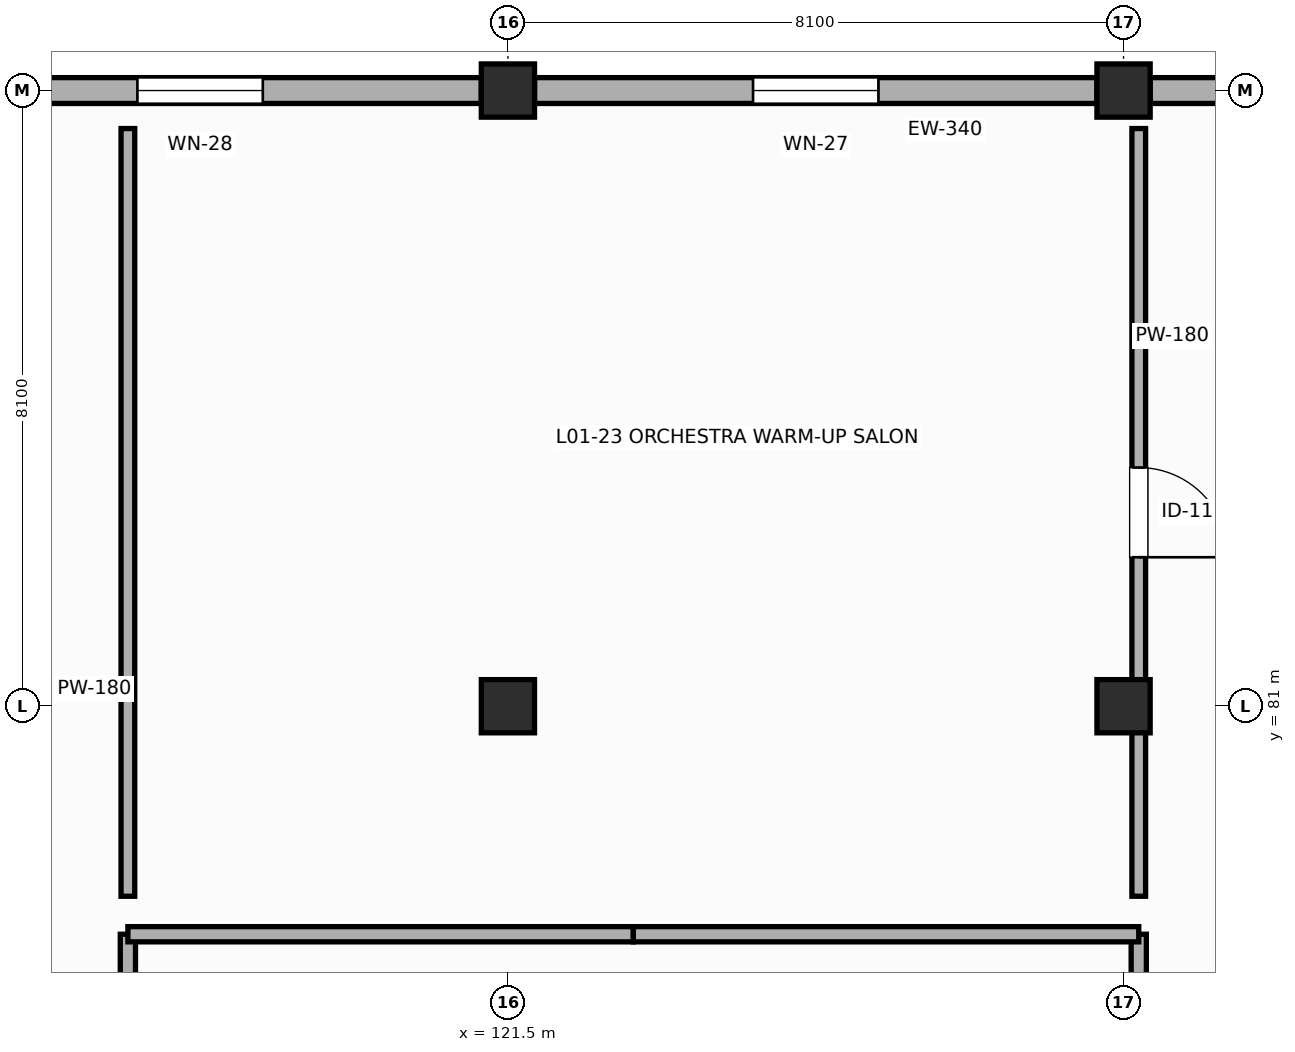
"""IFC4 building model, lengths in metres.
Left out: names, types, materials, properties, quantities, classifications, styles, units other than length and angle.
Written with IfcOpenShell. Run it as: python <this file> out.ifc"""

import sys

from ifc_helpers import new_model, si_unit, direction, frame, frame_2d, origin, origin_2d, place, context, subcontext, project, spatial, rectangle, extrude, element, fill, save


model = new_model("IFC4")
c1 = context("Model", 3, precision=1e-05, world=origin(), true_north=direction((0.0, 1.0)))
c2 = subcontext(c1, "Body", "Model", "MODEL_VIEW")
j1 = project(units=[si_unit("LENGTHUNIT", "METRE"), si_unit("PLANEANGLEUNIT", "RADIAN")], contexts=[c1])
p1 = place(None, origin())
s1 = spatial("IfcSite", under=j1, at=p1, CompositionType="ELEMENT")
p2 = place(p1, origin())
s2 = spatial("IfcBuilding", under=s1, at=p2, CompositionType="ELEMENT")
p3 = place(p2, frame((0.0, 0.0, 5.4)))
s3 = spatial("IfcBuildingStorey", under=s2, at=p3, CompositionType="ELEMENT", Elevation=5.4)
for number, where, z_axis, x_axis in (
    (1, (121.5, 81.0, 0.0), (0.0, 0.0, 1.0), (1.0, 0.0, 0.0)),
    (2, (121.5, 89.1, 0.0), (0.0, 0.0, 1.0), (1.0, 0.0, 0.0)),
    (3, (129.6, 81.0, 0.0), (0.0, 0.0, 1.0), (1.0, 0.0, 0.0)),
    (4, (129.6, 89.1, 0.0), (0.0, 0.0, 1.0), (1.0, 0.0, 0.0)),
):
    element("IfcColumn", number, at=place(p3, frame(where, z_axis=z_axis, x_axis=x_axis)), inside=s3, PredefinedType="COLUMN", context=c2, shape_type="SweptSolid", body=[
        extrude(rectangle(XDim=0.7, YDim=0.7, at=origin_2d()), origin(), (0.0, 0.0, 1.0), 4.8),
    ])
p4 = place(p3, frame((137.35, 89.1, 0.0), z_axis=(0.0, 0.0, 1.0), x_axis=(-1.0, 0.0, 0.0)))
e5 = element("IfcWall", 5, at=p4, inside=s3, PredefinedType="SOLIDWALL", context=c2, shape_type="SweptSolid", body=[
    extrude(rectangle(XDim=7.4, YDim=0.34, at=frame_2d((3.7, 0.0))), origin(), (0.0, 0.0, 1.0), 4.107),
])
p5 = place(p3, frame((129.25, 89.1, 0.0), z_axis=(0.0, 0.0, 1.0), x_axis=(-1.0, 0.0, 0.0)))
e6 = element("IfcWall", 6, at=p5, inside=s3, PredefinedType="SOLIDWALL", context=c2, shape_type="SweptSolid", body=[
    extrude(rectangle(XDim=7.4, YDim=0.34, at=frame_2d((3.7, 0.0))), origin(), (0.0, 0.0, 1.0), 4.055),
])
p6 = place(p5, frame((2.875, 0.0, 0.9)))
e7 = element("IfcOpeningElement", 7, at=p6, cuts=e6, PredefinedType="OPENING", context=c2, shape_type="SweptSolid", body=[
    extrude(rectangle(XDim=1.65, YDim=1.4, at=frame_2d((0.825, 0.7))), frame((0.0, 0.18, 0.0), z_axis=(0.0, -1.0, 0.0), x_axis=(1.0, 0.0, 0.0)), (0.0, 0.0, 1.0), 0.36),
])
p7 = place(p3, frame((121.15, 89.1, 0.0), z_axis=(0.0, 0.0, 1.0), x_axis=(-1.0, 0.0, 0.0)))
e8 = element("IfcWall", 8, at=p7, inside=s3, PredefinedType="SOLIDWALL", context=c2, shape_type="SweptSolid", body=[
    extrude(rectangle(XDim=7.4, YDim=0.34, at=frame_2d((3.7, 0.0))), origin(), (0.0, 0.0, 1.0), 4.107),
])
p8 = place(p7, frame((2.875, 0.0, 0.9)))
e9 = element("IfcOpeningElement", 9, at=p8, cuts=e8, PredefinedType="OPENING", context=c2, shape_type="SweptSolid", body=[
    extrude(rectangle(XDim=1.65, YDim=1.75, at=frame_2d((0.825, 0.875))), frame((0.0, 0.18, 0.0), z_axis=(0.0, -1.0, 0.0), x_axis=(1.0, 0.0, 0.0)), (0.0, 0.0, 1.0), 0.36),
])
p9 = place(p3, frame((129.8, 78.0, 0.0), z_axis=(0.0, 0.0, 1.0), x_axis=(0.0, -1.0, 0.0)))
e10 = element("IfcWall", 10, at=p9, inside=s3, PredefinedType="PARTITIONING", context=c2, shape_type="SweptSolid", body=[
    extrude(rectangle(XDim=11.0, YDim=0.2, at=frame_2d((5.5, 0.0))), origin(), (0.0, 0.0, 1.0), 3.824),
])
p10 = place(p9, frame((2.125, 0.0, 0.0)))
e11 = element("IfcOpeningElement", 11, at=p10, cuts=e10, PredefinedType="OPENING", context=c2, shape_type="SweptSolid", body=[
    extrude(rectangle(XDim=1.25, YDim=2.25, at=frame_2d((0.625, 1.125))), frame((0.0, 0.11, 0.0), z_axis=(0.0, -1.0, 0.0), x_axis=(1.0, 0.0, 0.0)), (0.0, 0.0, 1.0), 0.22),
])
p11 = place(p3, frame((116.5, 67.0, 0.0), z_axis=(0.0, 0.0, 1.0), x_axis=(0.0, 1.0, 0.0)))
e12 = element("IfcWall", 12, at=p11, inside=s3, PredefinedType="PARTITIONING", context=c2, shape_type="SweptSolid", body=[
    extrude(rectangle(XDim=11.0, YDim=0.2, at=frame_2d((5.5, 0.0))), origin(), (0.0, 0.0, 1.0), 4.52),
])
p12 = place(p3, frame((116.5, 78.0, 0.0), z_axis=(0.0, 0.0, 1.0), x_axis=(1.0, 0.0, 0.0)))
e13 = element("IfcWall", 13, at=p12, inside=s3, PredefinedType="PARTITIONING", context=c2, shape_type="SweptSolid", body=[
    extrude(rectangle(XDim=6.65, YDim=0.2, at=frame_2d((3.325, 0.0))), origin(), (0.0, 0.0, 1.0), 4.52),
])
p13 = place(p3, frame((123.15, 78.0, 0.0), z_axis=(0.0, 0.0, 1.0), x_axis=(1.0, 0.0, 0.0)))
e14 = element("IfcWall", 14, at=p13, inside=s3, PredefinedType="PARTITIONING", context=c2, shape_type="SweptSolid", body=[
    extrude(rectangle(XDim=6.65, YDim=0.2, at=frame_2d((3.325, 0.0))), origin(), (0.0, 0.0, 1.0), 4.52),
])
p14 = place(p3, frame((129.8, 88.6, 0.0), z_axis=(0.0, 0.0, 1.0), x_axis=(0.0, -1.0, 0.0)))
e15 = element("IfcWall", 15, at=p14, inside=s3, PredefinedType="PARTITIONING", context=c2, shape_type="SweptSolid", body=[
    extrude(rectangle(XDim=10.1, YDim=0.18, at=frame_2d((5.05, 0.0))), origin(), (0.0, 0.0, 1.0), 3.924),
])
p15 = place(p14, frame((4.46, 0.0, 0.0)))
e16 = element("IfcOpeningElement", 16, at=p15, cuts=e15, PredefinedType="OPENING", context=c2, shape_type="SweptSolid", body=[
    extrude(rectangle(XDim=1.18, YDim=2.22, at=frame_2d((0.59, 1.11))), frame((0.0, 0.1, 0.0), z_axis=(0.0, -1.0, 0.0), x_axis=(1.0, 0.0, 0.0)), (0.0, 0.0, 1.0), 0.2),
])
p16 = place(p3, frame((116.5, 78.5, 0.0), z_axis=(0.0, 0.0, 1.0), x_axis=(0.0, 1.0, 0.0)))
e17 = element("IfcWall", 17, at=p16, inside=s3, PredefinedType="PARTITIONING", context=c2, shape_type="SweptSolid", body=[
    extrude(rectangle(XDim=10.1, YDim=0.18, at=frame_2d((5.05, 0.0))), origin(), (0.0, 0.0, 1.0), 4.52),
])
p17 = place(p6, origin())
e18 = element("IfcWindow", 18, at=p17, inside=s3, PartitioningType="SINGLE_PANEL", PredefinedType="WINDOW", context=c2, shape_type="SweptSolid", body=[
    extrude(rectangle(XDim=1.65, YDim=1.4, at=frame_2d((0.825, 0.7))), frame((0.0, 0.03, 0.0), z_axis=(0.0, -1.0, 0.0), x_axis=(1.0, 0.0, 0.0)), (0.0, 0.0, 1.0), 0.06),
])
fill(e7, e18)
p18 = place(p8, origin())
e19 = element("IfcWindow", 19, at=p18, inside=s3, PartitioningType="SINGLE_PANEL", PredefinedType="WINDOW", context=c2, shape_type="SweptSolid", body=[
    extrude(rectangle(XDim=1.65, YDim=1.75, at=frame_2d((0.825, 0.875))), frame((0.0, 0.03, 0.0), z_axis=(0.0, -1.0, 0.0), x_axis=(1.0, 0.0, 0.0)), (0.0, 0.0, 1.0), 0.06),
])
fill(e9, e19)
p19 = place(p15, origin())
e20 = element("IfcDoor", 20, at=p19, inside=s3, OperationType="SINGLE_SWING_RIGHT", PredefinedType="DOOR", context=c2, shape_type="SweptSolid", body=[
    extrude(rectangle(XDim=1.18, YDim=2.22, at=frame_2d((0.59, 1.11))), frame((0.0, 0.025, 0.0), z_axis=(0.0, -1.0, 0.0), x_axis=(1.0, 0.0, 0.0)), (0.0, 0.0, 1.0), 0.05),
])
fill(e16, e20)
save(model, sys.argv[1])
